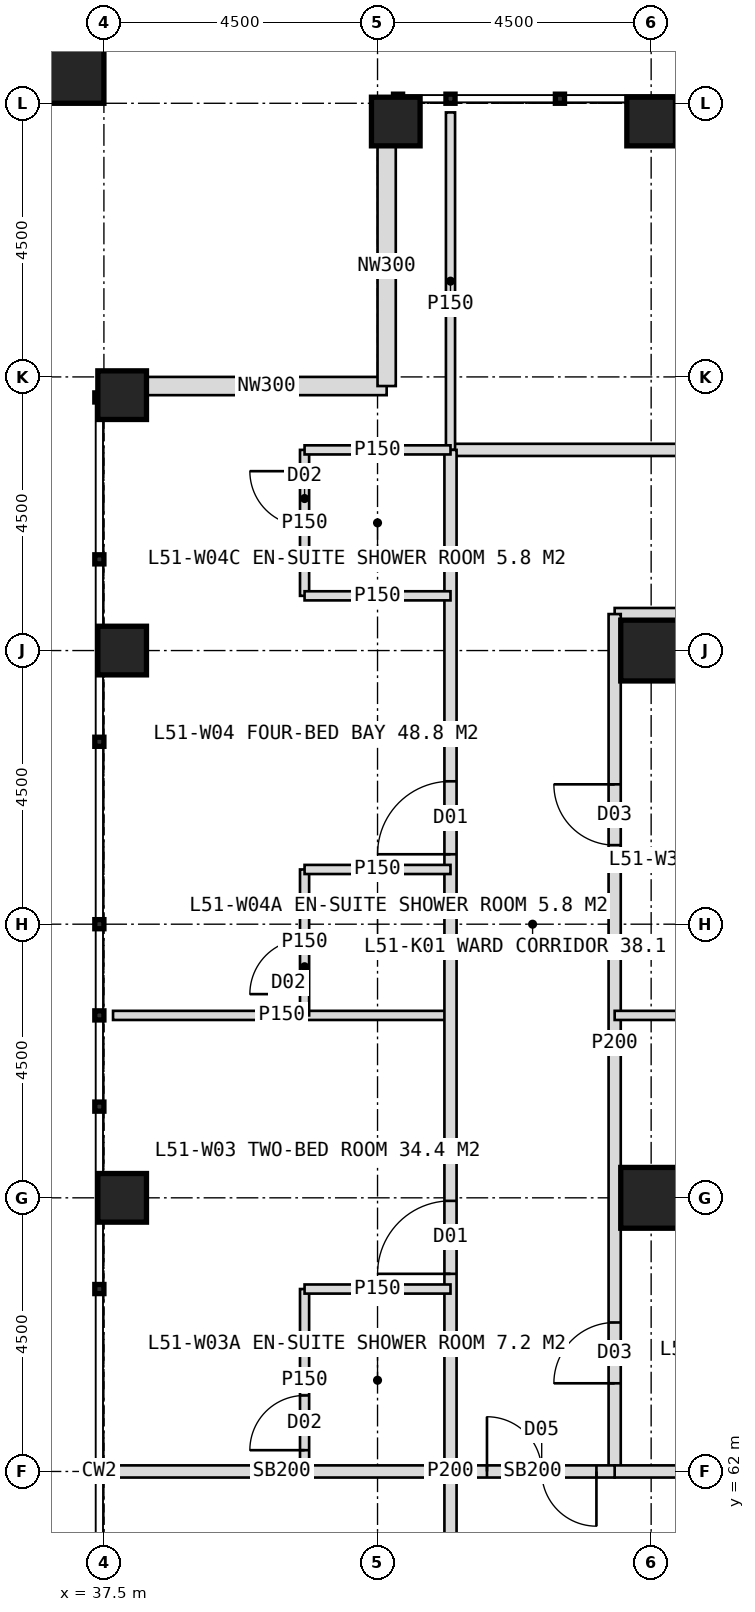
"""IFC4 building model, lengths in metres.
Left out: names, types, materials, properties, quantities, classifications, styles, units other than length and angle.
Written with IfcOpenShell. Run it as: python <this file> out.ifc"""

import sys

from ifc_helpers import new_model, si_unit, direction, frame, frame_2d, origin, origin_2d, place, context, subcontext, project, spatial, rectangle, hollow_rectangle, extrude, element, fill, save


model = new_model("IFC4")
c1 = context("Model", 3, precision=1e-05, world=origin(), true_north=direction((0.0, 1.0)))
c2 = subcontext(c1, "Body", "Model", "MODEL_VIEW")
j1 = project(units=[si_unit("LENGTHUNIT", "METRE"), si_unit("PLANEANGLEUNIT", "RADIAN")], contexts=[c1])
p1 = place(None, origin())
s1 = spatial("IfcSite", under=j1, at=p1, CompositionType="ELEMENT")
p2 = place(p1, origin())
s2 = spatial("IfcBuilding", under=s1, at=p2, CompositionType="ELEMENT")
p3 = place(p2, frame((0.0, 0.0, 213.0)))
s3 = spatial("IfcBuildingStorey", under=s2, at=p3, CompositionType="ELEMENT", Elevation=213.0)
for number, where, z_axis, x_axis in (
    (1, (46.5, 75.5, 0.0), (0.0, 0.0, 1.0), (1.0, 0.0, 0.0)),
    (2, (46.5, 66.5, 0.0), (0.0, 0.0, 1.0), (1.0, 0.0, 0.0)),
):
    element("IfcColumn", number, at=place(p3, frame(where, z_axis=z_axis, x_axis=x_axis)), inside=s3, PredefinedType="COLUMN", context=c2, shape_type="SweptSolid", body=[
        extrude(hollow_rectangle(XDim=1.0, YDim=1.0, WallThickness=0.1, at=origin_2d()), origin(), (0.0, 0.0, 1.0), 4.0),
    ])
for number, where, z_axis, x_axis in (
    (3, (42.3, 84.2, 0.0), (0.0, 0.0, 1.0), (1.0, 0.0, 0.0)),
    (4, (46.5, 84.2, 0.0), (0.0, 0.0, 1.0), (1.0, 0.0, 0.0)),
    (5, (37.8, 66.5, 0.0), (0.0, 0.0, 1.0), (1.0, 0.0, 0.0)),
    (6, (37.8, 75.5, 0.0), (0.0, 0.0, 1.0), (1.0, 0.0, 0.0)),
    (7, (37.8, 79.7, 0.0), (0.0, 0.0, 1.0), (1.0, 0.0, 0.0)),
):
    element("IfcColumn", number, at=place(p3, frame(where, z_axis=z_axis, x_axis=x_axis)), inside=s3, PredefinedType="COLUMN", context=c2, shape_type="SweptSolid", body=[
        extrude(hollow_rectangle(XDim=0.8, YDim=0.8, WallThickness=0.08, at=origin_2d()), origin(), (0.0, 0.0, 1.0), 4.0),
    ])
p4 = place(p3, frame((36.9, 85.1, 0.0), z_axis=(0.0, 0.0, 1.0), x_axis=(1.0, 0.0, 0.0)))
e8 = element("IfcColumn", 8, at=p4, inside=s3, PredefinedType="COLUMN", context=c2, shape_type="SweptSolid", body=[
    extrude(hollow_rectangle(XDim=1.2, YDim=1.2, WallThickness=0.07, at=origin_2d()), origin(), (0.0, 0.0, 1.0), 4.0),
])
for number, where, z_axis, x_axis in (
    (9, (38.2, 79.85, 0.0), (0.0, 0.0, 1.0), (1.0, 0.0, 0.0)),
    (10, (42.15, 79.85, 0.0), (0.0, 0.0, 1.0), (0.0, 1.0, 0.0)),
):
    element("IfcWall", number, at=place(p3, frame(where, z_axis=z_axis, x_axis=x_axis)), inside=s3, PredefinedType="ELEMENTEDWALL", context=c2, shape_type="SweptSolid", body=[
        extrude(rectangle(XDim=3.95, YDim=0.3, at=frame_2d((1.975, 0.0))), origin(), (0.0, 0.0, 1.0), 2.85),
    ])
p5 = place(p3, frame((43.2, 78.8, 0.0), z_axis=(0.0, 0.0, 1.0), x_axis=(1.0, 0.0, 0.0)))
e11 = element("IfcWall", 11, at=p5, inside=s3, PredefinedType="PARTITIONING", context=c2, shape_type="SweptSolid", body=[
    extrude(rectangle(XDim=33.6, YDim=0.2, at=frame_2d((16.8, 0.0))), origin(), (0.0, 0.0, 1.0), 3.75),
])
p6 = place(p5, frame((4.9, 0.0, 0.0)))
e12 = element("IfcOpeningElement", 12, at=p6, cuts=e11, PredefinedType="OPENING", context=c2, shape_type="SweptSolid", body=[
    extrude(rectangle(XDim=1.0, YDim=2.1, at=frame_2d((0.5, 1.05))), frame((0.0, 0.11, 0.0), z_axis=(0.0, -1.0, 0.0), x_axis=(1.0, 0.0, 0.0)), (0.0, 0.0, 1.0), 0.22),
])
p7 = place(p5, frame((14.05, 0.0, 0.0)))
e13 = element("IfcOpeningElement", 13, at=p7, cuts=e11, PredefinedType="OPENING", context=c2, shape_type="SweptSolid", body=[
    extrude(rectangle(XDim=1.2, YDim=2.2, at=frame_2d((0.6, 1.1))), frame((0.0, 0.11, 0.0), z_axis=(0.0, -1.0, 0.0), x_axis=(1.0, 0.0, 0.0)), (0.0, 0.0, 1.0), 0.22),
])
p8 = place(p5, frame((22.45, 0.0, 0.0)))
e14 = element("IfcOpeningElement", 14, at=p8, cuts=e11, PredefinedType="OPENING", context=c2, shape_type="SweptSolid", body=[
    extrude(rectangle(XDim=1.2, YDim=2.2, at=frame_2d((0.6, 1.1))), frame((0.0, 0.11, 0.0), z_axis=(0.0, -1.0, 0.0), x_axis=(1.0, 0.0, 0.0)), (0.0, 0.0, 1.0), 0.22),
])
p9 = place(p3, frame((43.2, 78.8, 0.0), z_axis=(0.0, 0.0, 1.0), x_axis=(0.0, 1.0, 0.0)))
e15 = element("IfcWall", 15, at=p9, inside=s3, PredefinedType="PARTITIONING", context=c2, shape_type="SweptSolid", body=[
    extrude(rectangle(XDim=5.55, YDim=0.15, at=frame_2d((2.775, 0.0))), origin(), (0.0, 0.0, 1.0), 3.75),
])
p10 = place(p3, frame((45.9, 76.1, 0.0), z_axis=(0.0, 0.0, 1.0), x_axis=(1.0, 0.0, 0.0)))
e16 = element("IfcWall", 16, at=p10, inside=s3, PredefinedType="PARTITIONING", context=c2, shape_type="SweptSolid", body=[
    extrude(rectangle(XDim=5.1, YDim=0.2, at=frame_2d((2.55, 0.0))), origin(), (0.0, 0.0, 1.0), 3.75),
])
p11 = place(p3, frame((43.2, 62.0, 0.0), z_axis=(0.0, 0.0, 1.0), x_axis=(-1.0, 0.0, 0.0)))
e17 = element("IfcWall", 17, at=p11, inside=s3, PredefinedType="SOLIDWALL", context=c2, shape_type="SweptSolid", body=[
    extrude(rectangle(XDim=5.55, YDim=0.2, at=frame_2d((2.775, 0.0))), origin(), (0.0, 0.0, 1.0), 2.95),
])
p12 = place(p3, frame((43.2, 69.5, 0.0), z_axis=(0.0, 0.0, 1.0), x_axis=(-1.0, 0.0, 0.0)))
e18 = element("IfcWall", 18, at=p12, inside=s3, PredefinedType="PARTITIONING", context=c2, shape_type="SweptSolid", body=[
    extrude(rectangle(XDim=5.55, YDim=0.15, at=frame_2d((2.775, 0.0))), origin(), (0.0, 0.0, 1.0), 3.75),
])
p13 = place(p3, frame((43.2, 45.2, 0.0), z_axis=(0.0, 0.0, 1.0), x_axis=(0.0, 1.0, 0.0)))
e19 = element("IfcWall", 19, at=p13, inside=s3, PredefinedType="PARTITIONING", context=c2, shape_type="SweptSolid", body=[
    extrude(rectangle(XDim=33.6, YDim=0.2, at=frame_2d((16.8, 0.0))), origin(), (0.0, 0.0, 1.0), 3.75),
])
p14 = place(p13, frame((3.25, 0.0, 0.0)))
e20 = element("IfcOpeningElement", 20, at=p14, cuts=e19, PredefinedType="OPENING", context=c2, shape_type="SweptSolid", body=[
    extrude(rectangle(XDim=1.2, YDim=2.2, at=frame_2d((0.6, 1.1))), frame((0.0, 0.11, 0.0), z_axis=(0.0, -1.0, 0.0), x_axis=(1.0, 0.0, 0.0)), (0.0, 0.0, 1.0), 0.22),
])
p15 = place(p13, frame((11.05, 0.0, 0.0)))
e21 = element("IfcOpeningElement", 21, at=p15, cuts=e19, PredefinedType="OPENING", context=c2, shape_type="SweptSolid", body=[
    extrude(rectangle(XDim=1.2, YDim=2.2, at=frame_2d((0.6, 1.1))), frame((0.0, 0.11, 0.0), z_axis=(0.0, -1.0, 0.0), x_axis=(1.0, 0.0, 0.0)), (0.0, 0.0, 1.0), 0.22),
])
p16 = place(p13, frame((20.05, 0.0, 0.0)))
e22 = element("IfcOpeningElement", 22, at=p16, cuts=e19, PredefinedType="OPENING", context=c2, shape_type="SweptSolid", body=[
    extrude(rectangle(XDim=1.2, YDim=2.2, at=frame_2d((0.6, 1.1))), frame((0.0, 0.11, 0.0), z_axis=(0.0, -1.0, 0.0), x_axis=(1.0, 0.0, 0.0)), (0.0, 0.0, 1.0), 0.22),
])
p17 = place(p13, frame((26.95, 0.0, 0.0)))
e23 = element("IfcOpeningElement", 23, at=p17, cuts=e19, PredefinedType="OPENING", context=c2, shape_type="SweptSolid", body=[
    extrude(rectangle(XDim=1.2, YDim=2.2, at=frame_2d((0.6, 1.1))), frame((0.0, 0.11, 0.0), z_axis=(0.0, -1.0, 0.0), x_axis=(1.0, 0.0, 0.0)), (0.0, 0.0, 1.0), 0.22),
])
p18 = place(p3, frame((40.8, 62.0, 0.0), z_axis=(0.0, 0.0, 1.0), x_axis=(0.0, 1.0, 0.0)))
e24 = element("IfcWall", 24, at=p18, inside=s3, PredefinedType="PARTITIONING", context=c2, shape_type="SweptSolid", body=[
    extrude(rectangle(XDim=3.0, YDim=0.15, at=frame_2d((1.5, 0.0))), origin(), (0.0, 0.0, 1.0), 3.75),
])
p19 = place(p18, frame((0.35, 0.0, 0.0)))
e25 = element("IfcOpeningElement", 25, at=p19, cuts=e24, PredefinedType="OPENING", context=c2, shape_type="SweptSolid", body=[
    extrude(rectangle(XDim=0.9, YDim=2.1, at=frame_2d((0.45, 1.05))), frame((0.0, 0.085, 0.0), z_axis=(0.0, -1.0, 0.0), x_axis=(1.0, 0.0, 0.0)), (0.0, 0.0, 1.0), 0.17),
])
p20 = place(p3, frame((43.2, 65.0, 0.0), z_axis=(0.0, 0.0, 1.0), x_axis=(-1.0, 0.0, 0.0)))
e26 = element("IfcWall", 26, at=p20, inside=s3, PredefinedType="PARTITIONING", context=c2, shape_type="SweptSolid", body=[
    extrude(rectangle(XDim=2.4, YDim=0.15, at=frame_2d((1.2, 0.0))), origin(), (0.0, 0.0, 1.0), 3.75),
])
p21 = place(p3, frame((40.8, 69.5, 0.0), z_axis=(0.0, 0.0, 1.0), x_axis=(0.0, 1.0, 0.0)))
e27 = element("IfcWall", 27, at=p21, inside=s3, PredefinedType="PARTITIONING", context=c2, shape_type="SweptSolid", body=[
    extrude(rectangle(XDim=2.4, YDim=0.15, at=frame_2d((1.2, 0.0))), origin(), (0.0, 0.0, 1.0), 3.75),
])
p22 = place(p21, frame((0.35, 0.0, 0.0)))
e28 = element("IfcOpeningElement", 28, at=p22, cuts=e27, PredefinedType="OPENING", context=c2, shape_type="SweptSolid", body=[
    extrude(rectangle(XDim=0.9, YDim=2.1, at=frame_2d((0.45, 1.05))), frame((0.0, 0.085, 0.0), z_axis=(0.0, -1.0, 0.0), x_axis=(1.0, 0.0, 0.0)), (0.0, 0.0, 1.0), 0.17),
])
p23 = place(p3, frame((43.2, 71.9, 0.0), z_axis=(0.0, 0.0, 1.0), x_axis=(-1.0, 0.0, 0.0)))
e29 = element("IfcWall", 29, at=p23, inside=s3, PredefinedType="PARTITIONING", context=c2, shape_type="SweptSolid", body=[
    extrude(rectangle(XDim=2.4, YDim=0.15, at=frame_2d((1.2, 0.0))), origin(), (0.0, 0.0, 1.0), 3.75),
])
p24 = place(p3, frame((40.8, 76.4, 0.0), z_axis=(0.0, 0.0, 1.0), x_axis=(0.0, 1.0, 0.0)))
e30 = element("IfcWall", 30, at=p24, inside=s3, PredefinedType="PARTITIONING", context=c2, shape_type="SweptSolid", body=[
    extrude(rectangle(XDim=2.4, YDim=0.15, at=frame_2d((1.2, 0.0))), origin(), (0.0, 0.0, 1.0), 3.75),
])
p25 = place(p24, frame((1.15, 0.0, 0.0)))
e31 = element("IfcOpeningElement", 31, at=p25, cuts=e30, PredefinedType="OPENING", context=c2, shape_type="SweptSolid", body=[
    extrude(rectangle(XDim=0.9, YDim=2.1, at=frame_2d((0.45, 1.05))), frame((0.0, 0.085, 0.0), z_axis=(0.0, -1.0, 0.0), x_axis=(1.0, 0.0, 0.0)), (0.0, 0.0, 1.0), 0.17),
])
for number, where, z_axis, x_axis in (
    (32, (43.2, 76.4, 0.0), (0.0, 0.0, 1.0), (-1.0, 0.0, 0.0)),
    (33, (43.2, 78.8, 0.0), (0.0, 0.0, 1.0), (-1.0, 0.0, 0.0)),
):
    element("IfcWall", number, at=place(p3, frame(where, z_axis=z_axis, x_axis=x_axis)), inside=s3, PredefinedType="PARTITIONING", context=c2, shape_type="SweptSolid", body=[
        extrude(rectangle(XDim=2.4, YDim=0.15, at=frame_2d((1.2, 0.0))), origin(), (0.0, 0.0, 1.0), 3.75),
    ])
p26 = place(p3, frame((45.9, 62.0, 0.0), z_axis=(0.0, 0.0, 1.0), x_axis=(0.0, 1.0, 0.0)))
e34 = element("IfcWall", 34, at=p26, inside=s3, PredefinedType="PARTITIONING", context=c2, shape_type="SweptSolid", body=[
    extrude(rectangle(XDim=14.1, YDim=0.2, at=frame_2d((7.05, 0.0))), origin(), (0.0, 0.0, 1.0), 3.75),
])
p27 = place(p26, frame((1.45, 0.0, 0.0)))
e35 = element("IfcOpeningElement", 35, at=p27, cuts=e34, PredefinedType="OPENING", context=c2, shape_type="SweptSolid", body=[
    extrude(rectangle(XDim=1.0, YDim=2.1, at=frame_2d((0.5, 1.05))), frame((0.0, 0.11, 0.0), z_axis=(0.0, -1.0, 0.0), x_axis=(1.0, 0.0, 0.0)), (0.0, 0.0, 1.0), 0.22),
])
p28 = place(p26, frame((10.3, 0.0, 0.0)))
e36 = element("IfcOpeningElement", 36, at=p28, cuts=e34, PredefinedType="OPENING", context=c2, shape_type="SweptSolid", body=[
    extrude(rectangle(XDim=1.0, YDim=2.1, at=frame_2d((0.5, 1.05))), frame((0.0, 0.11, 0.0), z_axis=(0.0, -1.0, 0.0), x_axis=(1.0, 0.0, 0.0)), (0.0, 0.0, 1.0), 0.22),
])
p29 = place(p3, frame((51.0, 62.0, 0.0), z_axis=(0.0, 0.0, 1.0), x_axis=(-1.0, 0.0, 0.0)))
e37 = element("IfcWall", 37, at=p29, inside=s3, PredefinedType="SOLIDWALL", context=c2, shape_type="SweptSolid", body=[
    extrude(rectangle(XDim=5.1, YDim=0.2, at=frame_2d((2.55, 0.0))), origin(), (0.0, 0.0, 1.0), 2.95),
])
p30 = place(p3, frame((51.0, 69.5, 0.0), z_axis=(0.0, 0.0, 1.0), x_axis=(-1.0, 0.0, 0.0)))
e38 = element("IfcWall", 38, at=p30, inside=s3, PredefinedType="PARTITIONING", context=c2, shape_type="SweptSolid", body=[
    extrude(rectangle(XDim=5.1, YDim=0.15, at=frame_2d((2.55, 0.0))), origin(), (0.0, 0.0, 1.0), 3.75),
])
p31 = place(p3, frame((45.9, 62.0, 0.0), z_axis=(0.0, 0.0, 1.0), x_axis=(-1.0, 0.0, 0.0)))
e39 = element("IfcWall", 39, at=p31, inside=s3, PredefinedType="SOLIDWALL", context=c2, shape_type="SweptSolid", body=[
    extrude(rectangle(XDim=2.7, YDim=0.2, at=frame_2d((1.35, 0.0))), origin(), (0.0, 0.0, 1.0), 2.95),
])
p32 = place(p31, frame((0.3, 0.0, 0.0)))
e40 = element("IfcOpeningElement", 40, at=p32, cuts=e39, PredefinedType="OPENING", context=c2, shape_type="SweptSolid", body=[
    extrude(rectangle(XDim=1.8, YDim=2.2, at=frame_2d((0.9, 1.1))), frame((0.0, 0.11, 0.0), z_axis=(0.0, -1.0, 0.0), x_axis=(1.0, 0.0, 0.0)), (0.0, 0.0, 1.0), 0.22),
])
p33 = place(p16, origin())
e41 = element("IfcDoor", 41, at=p33, inside=s3, OperationType="SINGLE_SWING_LEFT", PredefinedType="DOOR", context=c2, shape_type="SweptSolid", body=[
    extrude(rectangle(XDim=1.2, YDim=2.2, at=frame_2d((0.6, 1.1))), frame((0.0, 0.025, 0.0), z_axis=(0.0, -1.0, 0.0), x_axis=(1.0, 0.0, 0.0)), (0.0, 0.0, 1.0), 0.05),
])
fill(e22, e41)
p34 = place(p19, origin())
e42 = element("IfcDoor", 42, at=p34, inside=s3, OperationType="SINGLE_SWING_LEFT", PredefinedType="DOOR", context=c2, shape_type="SweptSolid", body=[
    extrude(rectangle(XDim=0.9, YDim=2.1, at=frame_2d((0.45, 1.05))), frame((0.0, 0.025, 0.0), z_axis=(0.0, -1.0, 0.0), x_axis=(1.0, 0.0, 0.0)), (0.0, 0.0, 1.0), 0.05),
])
fill(e25, e42)
p35 = place(p17, origin())
e43 = element("IfcDoor", 43, at=p35, inside=s3, OperationType="SINGLE_SWING_LEFT", PredefinedType="DOOR", context=c2, shape_type="SweptSolid", body=[
    extrude(rectangle(XDim=1.2, YDim=2.2, at=frame_2d((0.6, 1.1))), frame((0.0, 0.025, 0.0), z_axis=(0.0, -1.0, 0.0), x_axis=(1.0, 0.0, 0.0)), (0.0, 0.0, 1.0), 0.05),
])
fill(e23, e43)
p36 = place(p22, origin())
e44 = element("IfcDoor", 44, at=p36, inside=s3, OperationType="SINGLE_SWING_LEFT", PredefinedType="DOOR", context=c2, shape_type="SweptSolid", body=[
    extrude(rectangle(XDim=0.9, YDim=2.1, at=frame_2d((0.45, 1.05))), frame((0.0, 0.025, 0.0), z_axis=(0.0, -1.0, 0.0), x_axis=(1.0, 0.0, 0.0)), (0.0, 0.0, 1.0), 0.05),
])
fill(e28, e44)
p37 = place(p25, origin())
e45 = element("IfcDoor", 45, at=p37, inside=s3, OperationType="SINGLE_SWING_RIGHT", PredefinedType="DOOR", context=c2, shape_type="SweptSolid", body=[
    extrude(rectangle(XDim=0.9, YDim=2.1, at=frame_2d((0.45, 1.05))), frame((0.0, 0.025, 0.0), z_axis=(0.0, -1.0, 0.0), x_axis=(1.0, 0.0, 0.0)), (0.0, 0.0, 1.0), 0.05),
])
fill(e31, e45)
p38 = place(p27, origin())
e46 = element("IfcDoor", 46, at=p38, inside=s3, OperationType="SINGLE_SWING_LEFT", PredefinedType="DOOR", context=c2, shape_type="SweptSolid", body=[
    extrude(rectangle(XDim=1.0, YDim=2.1, at=frame_2d((0.5, 1.05))), frame((0.0, 0.025, 0.0), z_axis=(0.0, -1.0, 0.0), x_axis=(1.0, 0.0, 0.0)), (0.0, 0.0, 1.0), 0.05),
])
fill(e35, e46)
p39 = place(p28, origin())
e47 = element("IfcDoor", 47, at=p39, inside=s3, OperationType="SINGLE_SWING_RIGHT", PredefinedType="DOOR", context=c2, shape_type="SweptSolid", body=[
    extrude(rectangle(XDim=1.0, YDim=2.1, at=frame_2d((0.5, 1.05))), frame((0.0, 0.025, 0.0), z_axis=(0.0, -1.0, 0.0), x_axis=(1.0, 0.0, 0.0)), (0.0, 0.0, 1.0), 0.05),
])
fill(e36, e47)
p40 = place(p32, origin())
e48 = element("IfcDoor", 48, at=p40, inside=s3, OperationType="DOUBLE_DOOR_DOUBLE_SWING", PredefinedType="DOOR", context=c2, shape_type="SweptSolid", body=[
    extrude(rectangle(XDim=1.8, YDim=2.2, at=frame_2d((0.9, 1.1))), frame((0.0, 0.025, 0.0), z_axis=(0.0, -1.0, 0.0), x_axis=(1.0, 0.0, 0.0)), (0.0, 0.0, 1.0), 0.05),
])
fill(e40, e48)
save(model, sys.argv[1])
